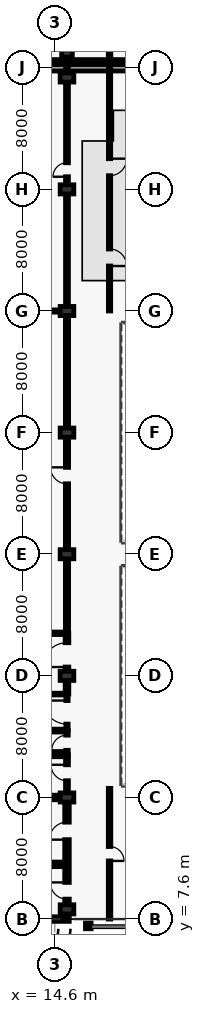
"""IFC4 building model, lengths in metres.
Left out: names, types, materials, properties, quantities, classifications, styles, units other than length and angle.
Written with IfcOpenShell. Run it as: python <this file> out.ifc"""

import sys

from ifc_helpers import new_model, si_unit, direction, frame, frame_2d, origin, origin_2d, place, context, subcontext, project, spatial, rectangle, i_section, extrude, element, fill, save


model = new_model("IFC4")
c1 = context("Model", 3, precision=1e-05, world=origin(), true_north=direction((0.0, 1.0)))
c2 = subcontext(c1, "Body", "Model", "MODEL_VIEW")
j1 = project(units=[si_unit("LENGTHUNIT", "METRE"), si_unit("PLANEANGLEUNIT", "RADIAN")], contexts=[c1])
p1 = place(None, origin())
s1 = spatial("IfcSite", under=j1, at=p1, CompositionType="ELEMENT")
p2 = place(p1, origin())
s2 = spatial("IfcBuilding", under=s1, at=p2, CompositionType="ELEMENT")
p3 = place(p2, frame((0.0, 0.0, 5.4)))
s3 = spatial("IfcBuildingStorey", under=s2, at=p3, CompositionType="ELEMENT", Elevation=5.4)
for number, where, z_axis, x_axis in (
    (1, (15.4, 8.24, 0.0), (0.0, 0.0, 1.0), (1.0, 0.0, 0.0)),
    (2, (15.4, 15.6, 0.0), (0.0, 0.0, 1.0), (1.0, 0.0, 0.0)),
    (3, (15.4, 23.6, 0.0), (0.0, 0.0, 1.0), (1.0, 0.0, 0.0)),
    (4, (15.4, 31.6, 0.0), (0.0, 0.0, 1.0), (1.0, 0.0, 0.0)),
    (5, (15.4, 39.6, 0.0), (0.0, 0.0, 1.0), (1.0, 0.0, 0.0)),
    (6, (15.4, 47.6, 0.0), (0.0, 0.0, 1.0), (1.0, 0.0, 0.0)),
    (7, (15.4, 55.6, 0.0), (0.0, 0.0, 1.0), (1.0, 0.0, 0.0)),
    (8, (15.4, 62.96, 0.0), (0.0, 0.0, 1.0), (1.0, 0.0, 0.0)),
):
    element("IfcColumn", number, at=place(p3, frame(where, z_axis=z_axis, x_axis=x_axis)), inside=s3, PredefinedType="COLUMN", context=c2, shape_type="SweptSolid", body=[
        extrude(rectangle(XDim=0.6, YDim=0.9, at=origin_2d()), origin(), (0.0, 0.0, 1.0), 4.8),
    ])
p4 = place(p3, frame((15.4, 64.64, 0.0), z_axis=(0.0, 0.0, 1.0), x_axis=(1.0, 0.0, 0.0)))
e9 = element("IfcColumn", 9, at=p4, inside=s3, PredefinedType="COLUMN", context=c2, shape_type="SweptSolid", body=[
    extrude(rectangle(XDim=0.7, YDim=0.7, at=origin_2d()), origin(), (0.0, 0.0, 1.0), 4.8),
])
p5 = place(p3, frame((16.8, 7.15, 0.0), z_axis=(0.0, 0.0, 1.0), x_axis=(1.0, 0.0, 0.0)))
e10 = element("IfcColumn", 10, at=p5, inside=s3, PredefinedType="COLUMN", context=c2, shape_type="SweptSolid", body=[
    extrude(i_section(OverallWidth=0.373, OverallDepth=0.368, WebThickness=0.014, FlangeThickness=0.024, at=origin_2d()), origin(), (0.0, 0.0, 1.0), 4.8),
])
p6 = place(p3, frame((8.0, 63.6, 0.0), z_axis=(0.0, 0.0, 1.0), x_axis=(1.0, 0.0, 0.0)))
e11 = element("IfcWall", 11, at=p6, inside=s3, PredefinedType="SOLIDWALL", context=c2, shape_type="SweptSolid", body=[
    extrude(rectangle(XDim=38.0, YDim=0.425, at=frame_2d((19.0, 0.0))), origin(), (0.0, 0.0, 1.0), 4.52),
])
p7 = place(p3, frame((40.2, 64.0, 0.0), z_axis=(0.0, 0.0, 1.0), x_axis=(-1.0, 0.0, 0.0)))
e12 = element("IfcWall", 12, at=p7, inside=s3, PredefinedType="SOLIDWALL", context=c2, shape_type="SweptSolid", body=[
    extrude(rectangle(XDim=32.2, YDim=0.275, at=frame_2d((16.1, 0.0))), origin(), (0.0, 0.0, 1.0), 3.075),
])
p8 = place(p3, frame((15.4, 64.15, 0.0), z_axis=(0.0, 0.0, 1.0), x_axis=(0.0, 1.0, 0.0)))
e13 = element("IfcWall", 13, at=p8, inside=s3, PredefinedType="SHEAR", context=c2, shape_type="SweptSolid", body=[
    extrude(rectangle(XDim=7.098, YDim=0.3, at=frame_2d((3.549, 0.0))), origin(), (0.0, 0.0, 1.0), 4.475),
])
p9 = place(p8, frame((1.1, 0.0, 0.0)))
e14 = element("IfcOpeningElement", 14, at=p9, cuts=e13, PredefinedType="OPENING", context=c2, shape_type="SweptSolid", body=[
    extrude(rectangle(XDim=1.1, YDim=2.15, at=frame_2d((0.55, 1.075))), frame((0.0, 0.16, 0.0), z_axis=(0.0, -1.0, 0.0), x_axis=(1.0, 0.0, 0.0)), (0.0, 0.0, 1.0), 0.32),
])
p10 = place(p8, frame((4.875, 0.0, 0.0)))
e15 = element("IfcOpeningElement", 15, at=p10, cuts=e13, PredefinedType="OPENING", context=c2, shape_type="SweptSolid", body=[
    extrude(rectangle(XDim=1.15, YDim=2.2, at=frame_2d((0.575, 1.1))), frame((0.0, 0.16, 0.0), z_axis=(0.0, -1.0, 0.0), x_axis=(1.0, 0.0, 0.0)), (0.0, 0.0, 1.0), 0.32),
])
p11 = place(p3, frame((7.85, 7.6, 0.0), z_axis=(0.0, 0.0, 1.0), x_axis=(1.0, 0.0, 0.0)))
e16 = element("IfcWall", 16, at=p11, inside=s3, PredefinedType="SHEAR", context=c2, shape_type="SweptSolid", body=[
    extrude(rectangle(XDim=7.7, YDim=0.3, at=frame_2d((3.85, 0.0))), origin(), (0.0, 0.0, 1.0), 4.52),
])
p12 = place(p3, frame((7.85, 15.6, 0.0), z_axis=(0.0, 0.0, 1.0), x_axis=(1.0, 0.0, 0.0)))
e17 = element("IfcWall", 17, at=p12, inside=s3, PredefinedType="SHEAR", context=c2, shape_type="SweptSolid", body=[
    extrude(rectangle(XDim=7.248, YDim=0.3, at=frame_2d((3.624, 0.0))), origin(), (0.0, 0.0, 1.0), 4.52),
])
p13 = place(p3, frame((15.4, 8.692, 0.0), z_axis=(0.0, 0.0, 1.0), x_axis=(0.0, 1.0, 0.0)))
e18 = element("IfcWall", 18, at=p13, inside=s3, PredefinedType="SHEAR", context=c2, shape_type="SweptSolid", body=[
    extrude(rectangle(XDim=6.456, YDim=0.3, at=frame_2d((3.228, 0.0))), origin(), (0.0, 0.0, 1.0), 4.52),
])
p14 = place(p13, frame((0.22, 0.0, 0.0)))
e19 = element("IfcOpeningElement", 19, at=p14, cuts=e18, PredefinedType="OPENING", context=c2, shape_type="SweptSolid", body=[
    extrude(rectangle(XDim=1.1, YDim=2.15, at=frame_2d((0.55, 1.075))), frame((0.0, 0.16, 0.0), z_axis=(0.0, -1.0, 0.0), x_axis=(1.0, 0.0, 0.0)), (0.0, 0.0, 1.0), 0.32),
])
p15 = place(p13, frame((4.133, 0.0, 0.0)))
e20 = element("IfcOpeningElement", 20, at=p15, cuts=e18, PredefinedType="OPENING", context=c2, shape_type="SweptSolid", body=[
    extrude(rectangle(XDim=1.15, YDim=2.2, at=frame_2d((0.575, 1.1))), frame((0.0, 0.16, 0.0), z_axis=(0.0, -1.0, 0.0), x_axis=(1.0, 0.0, 0.0)), (0.0, 0.0, 1.0), 0.32),
])
p16 = place(p3, frame((8.15, 11.2, 0.0), z_axis=(0.0, 0.0, 1.0), x_axis=(1.0, 0.0, 0.0)))
e21 = element("IfcWall", 21, at=p16, inside=s3, PredefinedType="SHEAR", context=c2, shape_type="SweptSolid", body=[
    extrude(rectangle(XDim=7.1, YDim=0.3, at=frame_2d((3.55, 0.0))), origin(), (0.0, 0.0, 1.0), 4.52),
])
p17 = place(p3, frame((15.4, 16.052, 0.0), z_axis=(0.0, 0.0, 1.0), x_axis=(0.0, 1.0, 0.0)))
e22 = element("IfcWall", 22, at=p17, inside=s3, PredefinedType="PARTITIONING", context=c2, shape_type="SweptSolid", body=[
    extrude(rectangle(XDim=2.348, YDim=0.19, at=frame_2d((1.174, 0.0))), origin(), (0.0, 0.0, 1.0), 3.67),
])
p18 = place(p17, frame((0.649, 0.0, 0.0)))
e23 = element("IfcOpeningElement", 23, at=p18, cuts=e22, PredefinedType="OPENING", context=c2, shape_type="SweptSolid", body=[
    extrude(rectangle(XDim=1.05, YDim=2.15, at=frame_2d((0.525, 1.075))), frame((0.0, 0.105, 0.0), z_axis=(0.0, -1.0, 0.0), x_axis=(1.0, 0.0, 0.0)), (0.0, 0.0, 1.0), 0.21),
])
p19 = place(p3, frame((15.4, 18.4, 0.0), z_axis=(0.0, 0.0, 1.0), x_axis=(0.0, 1.0, 0.0)))
e24 = element("IfcWall", 24, at=p19, inside=s3, PredefinedType="PARTITIONING", context=c2, shape_type="SweptSolid", body=[
    extrude(rectangle(XDim=1.6, YDim=0.165, at=frame_2d((0.8, 0.0))), origin(), (0.0, 0.0, 1.0), 3.67),
])
p20 = place(p19, frame((0.3, 0.0, 0.0)))
e25 = element("IfcOpeningElement", 25, at=p20, cuts=e24, PredefinedType="OPENING", context=c2, shape_type="SweptSolid", body=[
    extrude(rectangle(XDim=1.0, YDim=2.1, at=frame_2d((0.5, 1.05))), frame((0.0, 0.093, 0.0), z_axis=(0.0, -1.0, 0.0), x_axis=(1.0, 0.0, 0.0)), (0.0, 0.0, 1.0), 0.185),
])
p21 = place(p3, frame((15.4, 20.0, 0.0), z_axis=(0.0, 0.0, 1.0), x_axis=(0.0, 1.0, 0.0)))
e26 = element("IfcWall", 26, at=p21, inside=s3, PredefinedType="PARTITIONING", context=c2, shape_type="SweptSolid", body=[
    extrude(rectangle(XDim=2.4, YDim=0.15, at=frame_2d((1.2, 0.0))), origin(), (0.0, 0.0, 1.0), 3.67),
])
p22 = place(p21, frame((0.425, 0.0, 0.0)))
e27 = element("IfcOpeningElement", 27, at=p22, cuts=e26, PredefinedType="OPENING", context=c2, shape_type="SweptSolid", body=[
    extrude(rectangle(XDim=1.55, YDim=2.25, at=frame_2d((0.775, 1.125))), frame((0.0, 0.085, 0.0), z_axis=(0.0, -1.0, 0.0), x_axis=(1.0, 0.0, 0.0)), (0.0, 0.0, 1.0), 0.17),
])
p23 = place(p3, frame((15.4, 22.4, 0.0), z_axis=(0.0, 0.0, 1.0), x_axis=(0.0, 1.0, 0.0)))
e28 = element("IfcWall", 28, at=p23, inside=s3, PredefinedType="PARTITIONING", context=c2, shape_type="SweptSolid", body=[
    extrude(rectangle(XDim=4.0, YDim=0.24, at=frame_2d((2.0, 0.0))), origin(), (0.0, 0.0, 1.0), 3.67),
])
p24 = place(p23, frame((1.78, 0.0, 0.0)))
e29 = element("IfcOpeningElement", 29, at=p24, cuts=e28, PredefinedType="OPENING", context=c2, shape_type="SweptSolid", body=[
    extrude(rectangle(XDim=1.6, YDim=2.3, at=frame_2d((0.8, 1.15))), frame((0.0, 0.13, 0.0), z_axis=(0.0, -1.0, 0.0), x_axis=(1.0, 0.0, 0.0)), (0.0, 0.0, 1.0), 0.26),
])
p25 = place(p3, frame((15.4, 26.4, 0.0), z_axis=(0.0, 0.0, 1.0), x_axis=(0.0, 1.0, 0.0)))
e30 = element("IfcWall", 30, at=p25, inside=s3, PredefinedType="PARTITIONING", context=c2, shape_type="SweptSolid", body=[
    extrude(rectangle(XDim=20.748, YDim=0.21, at=frame_2d((10.374, 0.0))), origin(), (0.0, 0.0, 1.0), 3.67),
])
p26 = place(p25, frame((9.834, 0.0, 0.0)))
e31 = element("IfcOpeningElement", 31, at=p26, cuts=e30, PredefinedType="OPENING", context=c2, shape_type="SweptSolid", body=[
    extrude(rectangle(XDim=1.08, YDim=2.15, at=frame_2d((0.54, 1.075))), frame((0.0, 0.115, 0.0), z_axis=(0.0, -1.0, 0.0), x_axis=(1.0, 0.0, 0.0)), (0.0, 0.0, 1.0), 0.23),
])
p27 = place(p3, frame((15.4, 48.052, 0.0), z_axis=(0.0, 0.0, 1.0), x_axis=(0.0, 1.0, 0.0)))
e32 = element("IfcWall", 32, at=p27, inside=s3, PredefinedType="PARTITIONING", context=c2, shape_type="SweptSolid", body=[
    extrude(rectangle(XDim=15.548, YDim=0.19, at=frame_2d((7.774, 0.0))), origin(), (0.0, 0.0, 1.0), 3.67),
])
p28 = place(p27, frame((8.38, 0.0, 0.0)))
e33 = element("IfcOpeningElement", 33, at=p28, cuts=e32, PredefinedType="OPENING", context=c2, shape_type="SweptSolid", body=[
    extrude(rectangle(XDim=0.92, YDim=2.1, at=frame_2d((0.46, 1.05))), frame((0.0, 0.105, 0.0), z_axis=(0.0, -1.0, 0.0), x_axis=(1.0, 0.0, 0.0)), (0.0, 0.0, 1.0), 0.21),
])
p29 = place(p3, frame((18.2, 16.2, 0.0), z_axis=(0.0, 0.0, 1.0), x_axis=(0.0, -1.0, 0.0)))
e34 = element("IfcWall", 34, at=p29, inside=s3, PredefinedType="PARTITIONING", context=c2, shape_type="SweptSolid", body=[
    extrude(rectangle(XDim=8.6, YDim=0.165, at=frame_2d((4.3, 0.0))), origin(), (0.0, 0.0, 1.0), 4.52),
])
p30 = place(p29, frame((3.825, 0.0, 0.0)))
e35 = element("IfcOpeningElement", 35, at=p30, cuts=e34, PredefinedType="OPENING", context=c2, shape_type="SweptSolid", body=[
    extrude(rectangle(XDim=0.95, YDim=2.1, at=frame_2d((0.475, 1.05))), frame((0.0, 0.093, 0.0), z_axis=(0.0, -1.0, 0.0), x_axis=(1.0, 0.0, 0.0)), (0.0, 0.0, 1.0), 0.185),
])
p31 = place(p3, frame((18.2, 63.6, 0.0), z_axis=(0.0, 0.0, 1.0), x_axis=(0.0, -1.0, 0.0)))
e36 = element("IfcWall", 36, at=p31, inside=s3, PredefinedType="PARTITIONING", context=c2, shape_type="SweptSolid", body=[
    extrude(rectangle(XDim=16.0, YDim=0.15, at=frame_2d((8.0, 0.0))), origin(), (0.0, 0.0, 1.0), 4.52),
])
p32 = place(p31, frame((5.98, 0.0, 0.0)))
e37 = element("IfcOpeningElement", 37, at=p32, cuts=e36, PredefinedType="OPENING", context=c2, shape_type="SweptSolid", body=[
    extrude(rectangle(XDim=1.12, YDim=2.15, at=frame_2d((0.56, 1.075))), frame((0.0, 0.085, 0.0), z_axis=(0.0, -1.0, 0.0), x_axis=(1.0, 0.0, 0.0)), (0.0, 0.0, 1.0), 0.17),
])
p33 = place(p31, frame((11.92, 0.0, 0.0)))
e38 = element("IfcOpeningElement", 38, at=p33, cuts=e36, PredefinedType="OPENING", context=c2, shape_type="SweptSolid", body=[
    extrude(rectangle(XDim=1.12, YDim=2.15, at=frame_2d((0.56, 1.075))), frame((0.0, 0.085, 0.0), z_axis=(0.0, -1.0, 0.0), x_axis=(1.0, 0.0, 0.0)), (0.0, 0.0, 1.0), 0.17),
])
p34 = place(p3, frame((12.0, 18.4, 0.0), z_axis=(0.0, 0.0, 1.0), x_axis=(1.0, 0.0, 0.0)))
e39 = element("IfcWall", 39, at=p34, inside=s3, PredefinedType="PARTITIONING", context=c2, shape_type="SweptSolid", body=[
    extrude(rectangle(XDim=3.4, YDim=0.24, at=frame_2d((1.7, 0.0))), origin(), (0.0, 0.0, 1.0), 4.52),
])
p35 = place(p3, frame((8.0, 20.0, 0.0), z_axis=(0.0, 0.0, 1.0), x_axis=(1.0, 0.0, 0.0)))
e40 = element("IfcWall", 40, at=p35, inside=s3, PredefinedType="PARTITIONING", context=c2, shape_type="SweptSolid", body=[
    extrude(rectangle(XDim=7.4, YDim=0.19, at=frame_2d((3.7, 0.0))), origin(), (0.0, 0.0, 1.0), 4.52),
])
p36 = place(p3, frame((8.0, 22.4, 0.0), z_axis=(0.0, 0.0, 1.0), x_axis=(1.0, 0.0, 0.0)))
e41 = element("IfcWall", 41, at=p36, inside=s3, PredefinedType="PARTITIONING", context=c2, shape_type="SweptSolid", body=[
    extrude(rectangle(XDim=7.4, YDim=0.115, at=frame_2d((3.7, 0.0))), origin(), (0.0, 0.0, 1.0), 4.52),
])
p37 = place(p3, frame((8.0, 26.4, 0.0), z_axis=(0.0, 0.0, 1.0), x_axis=(1.0, 0.0, 0.0)))
e42 = element("IfcWall", 42, at=p37, inside=s3, PredefinedType="PARTITIONING", context=c2, shape_type="SweptSolid", body=[
    extrude(rectangle(XDim=7.4, YDim=0.165, at=frame_2d((3.7, 0.0))), origin(), (0.0, 0.0, 1.0), 4.52),
])
p38 = place(p3, frame((8.0, 47.6, 0.0), z_axis=(0.0, 0.0, 1.0), x_axis=(1.0, 0.0, 0.0)))
e43 = element("IfcWall", 43, at=p38, inside=s3, PredefinedType="PARTITIONING", context=c2, shape_type="SweptSolid", body=[
    extrude(rectangle(XDim=7.098, YDim=0.15, at=frame_2d((3.549, 0.0))), origin(), (0.0, 0.0, 1.0), 3.87),
])
p39 = place(p3, frame((18.2, 79.6, 0.0), z_axis=(0.0, 0.0, 1.0), x_axis=(0.0, -1.0, 0.0)))
e44 = element("IfcWall", 44, at=p39, inside=s3, PredefinedType="PARTITIONING", context=c2, shape_type="SweptSolid", body=[
    extrude(rectangle(XDim=15.6, YDim=0.165, at=frame_2d((7.8, 0.0))), origin(), (0.0, 0.0, 1.0), 4.475),
])
p40 = place(p39, frame((6.975, 0.0, 0.0)))
e45 = element("IfcOpeningElement", 45, at=p40, cuts=e44, PredefinedType="OPENING", context=c2, shape_type="SweptSolid", body=[
    extrude(rectangle(XDim=1.65, YDim=2.3, at=frame_2d((0.825, 1.15))), frame((0.0, 0.093, 0.0), z_axis=(0.0, -1.0, 0.0), x_axis=(1.0, 0.0, 0.0)), (0.0, 0.0, 1.0), 0.185),
])
p41 = place(p39, frame((11.343, 0.0, 0.0)))
e46 = element("IfcOpeningElement", 46, at=p41, cuts=e44, PredefinedType="OPENING", context=c2, shape_type="SweptSolid", body=[
    extrude(rectangle(XDim=1.65, YDim=2.3, at=frame_2d((0.825, 1.15))), frame((0.0, 0.093, 0.0), z_axis=(0.0, -1.0, 0.0), x_axis=(1.0, 0.0, 0.0)), (0.0, 0.0, 1.0), 0.185),
])
p42 = place(p14, origin())
e47 = element("IfcDoor", 47, at=p42, inside=s3, OperationType="SINGLE_SWING_RIGHT", PredefinedType="DOOR", context=c2, shape_type="SweptSolid", body=[
    extrude(rectangle(XDim=1.1, YDim=2.15, at=frame_2d((0.55, 1.075))), frame((0.0, 0.025, 0.0), z_axis=(0.0, -1.0, 0.0), x_axis=(1.0, 0.0, 0.0)), (0.0, 0.0, 1.0), 0.05),
])
fill(e19, e47)
p43 = place(p15, origin())
e48 = element("IfcDoor", 48, at=p43, inside=s3, OperationType="SINGLE_SWING_LEFT", PredefinedType="DOOR", context=c2, shape_type="SweptSolid", body=[
    extrude(rectangle(XDim=1.15, YDim=2.2, at=frame_2d((0.575, 1.1))), frame((0.0, 0.025, 0.0), z_axis=(0.0, -1.0, 0.0), x_axis=(1.0, 0.0, 0.0)), (0.0, 0.0, 1.0), 0.05),
])
fill(e20, e48)
p44 = place(p18, origin())
e49 = element("IfcDoor", 49, at=p44, inside=s3, OperationType="SINGLE_SWING_RIGHT", PredefinedType="DOOR", context=c2, shape_type="SweptSolid", body=[
    extrude(rectangle(XDim=1.05, YDim=2.15, at=frame_2d((0.525, 1.075))), frame((0.0, 0.025, 0.0), z_axis=(0.0, -1.0, 0.0), x_axis=(1.0, 0.0, 0.0)), (0.0, 0.0, 1.0), 0.05),
])
fill(e23, e49)
p45 = place(p20, origin())
e50 = element("IfcDoor", 50, at=p45, inside=s3, OperationType="SINGLE_SWING_LEFT", PredefinedType="DOOR", context=c2, shape_type="SweptSolid", body=[
    extrude(rectangle(XDim=1.0, YDim=2.1, at=frame_2d((0.5, 1.05))), frame((0.0, 0.025, 0.0), z_axis=(0.0, -1.0, 0.0), x_axis=(1.0, 0.0, 0.0)), (0.0, 0.0, 1.0), 0.05),
])
fill(e25, e50)
p46 = place(p22, origin())
e51 = element("IfcDoor", 51, at=p46, inside=s3, OperationType="SINGLE_SWING_RIGHT", PredefinedType="DOOR", context=c2, shape_type="SweptSolid", body=[
    extrude(rectangle(XDim=1.55, YDim=2.25, at=frame_2d((0.775, 1.125))), frame((0.0, 0.025, 0.0), z_axis=(0.0, -1.0, 0.0), x_axis=(1.0, 0.0, 0.0)), (0.0, 0.0, 1.0), 0.05),
])
fill(e27, e51)
p47 = place(p24, origin())
e52 = element("IfcDoor", 52, at=p47, inside=s3, OperationType="SINGLE_SWING_LEFT", PredefinedType="DOOR", context=c2, shape_type="SweptSolid", body=[
    extrude(rectangle(XDim=1.6, YDim=2.3, at=frame_2d((0.8, 1.15))), frame((0.0, 0.025, 0.0), z_axis=(0.0, -1.0, 0.0), x_axis=(1.0, 0.0, 0.0)), (0.0, 0.0, 1.0), 0.05),
])
fill(e29, e52)
p48 = place(p26, origin())
e53 = element("IfcDoor", 53, at=p48, inside=s3, OperationType="SINGLE_SWING_RIGHT", PredefinedType="DOOR", context=c2, shape_type="SweptSolid", body=[
    extrude(rectangle(XDim=1.08, YDim=2.15, at=frame_2d((0.54, 1.075))), frame((0.0, 0.025, 0.0), z_axis=(0.0, -1.0, 0.0), x_axis=(1.0, 0.0, 0.0)), (0.0, 0.0, 1.0), 0.05),
])
fill(e31, e53)
p49 = place(p28, origin())
e54 = element("IfcDoor", 54, at=p49, inside=s3, OperationType="SINGLE_SWING_LEFT", PredefinedType="DOOR", context=c2, shape_type="SweptSolid", body=[
    extrude(rectangle(XDim=0.92, YDim=2.1, at=frame_2d((0.46, 1.05))), frame((0.0, 0.025, 0.0), z_axis=(0.0, -1.0, 0.0), x_axis=(1.0, 0.0, 0.0)), (0.0, 0.0, 1.0), 0.05),
])
fill(e33, e54)
p50 = place(p30, origin())
e55 = element("IfcDoor", 55, at=p50, inside=s3, OperationType="SINGLE_SWING_RIGHT", PredefinedType="DOOR", context=c2, shape_type="SweptSolid", body=[
    extrude(rectangle(XDim=0.95, YDim=2.1, at=frame_2d((0.475, 1.05))), frame((0.0, 0.025, 0.0), z_axis=(0.0, -1.0, 0.0), x_axis=(1.0, 0.0, 0.0)), (0.0, 0.0, 1.0), 0.05),
])
fill(e35, e55)
p51 = place(p32, origin())
e56 = element("IfcDoor", 56, at=p51, inside=s3, OperationType="SINGLE_SWING_LEFT", PredefinedType="DOOR", context=c2, shape_type="SweptSolid", body=[
    extrude(rectangle(XDim=1.12, YDim=2.15, at=frame_2d((0.56, 1.075))), frame((0.0, 0.025, 0.0), z_axis=(0.0, -1.0, 0.0), x_axis=(1.0, 0.0, 0.0)), (0.0, 0.0, 1.0), 0.05),
])
fill(e37, e56)
p52 = place(p33, origin())
e57 = element("IfcDoor", 57, at=p52, inside=s3, OperationType="SINGLE_SWING_RIGHT", PredefinedType="DOOR", context=c2, shape_type="SweptSolid", body=[
    extrude(rectangle(XDim=1.12, YDim=2.15, at=frame_2d((0.56, 1.075))), frame((0.0, 0.025, 0.0), z_axis=(0.0, -1.0, 0.0), x_axis=(1.0, 0.0, 0.0)), (0.0, 0.0, 1.0), 0.05),
])
fill(e38, e57)
save(model, sys.argv[1])
